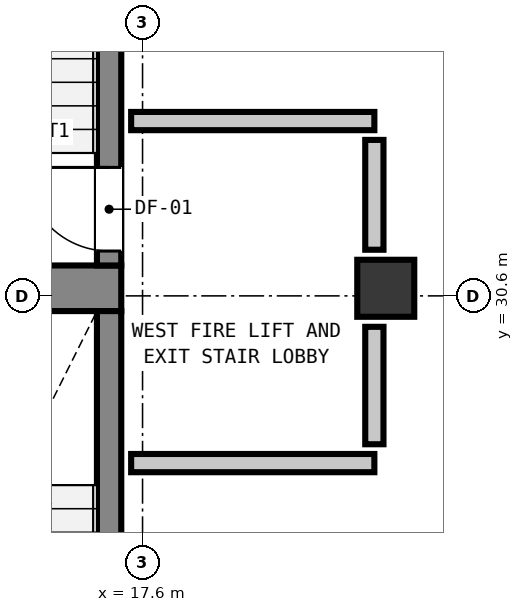
"""IFC4 building model, lengths in metres.
Left out: names, types, materials, properties, quantities, classifications, styles, units other than length and angle.
Written with IfcOpenShell. Run it as: python <this file> out.ifc"""

import sys

from ifc_helpers import new_model, si_unit, direction, frame, frame_2d, origin, origin_2d, place, context, subcontext, project, spatial, rectangle, extrude, element, fill, save


model = new_model("IFC4")
c1 = context("Model", 3, precision=1e-05, world=origin(), true_north=direction((0.0, 1.0)))
c2 = subcontext(c1, "Body", "Model", "MODEL_VIEW")
j1 = project(units=[si_unit("LENGTHUNIT", "METRE"), si_unit("PLANEANGLEUNIT", "RADIAN")], contexts=[c1])
p1 = place(None, origin())
s1 = spatial("IfcSite", under=j1, at=p1, CompositionType="ELEMENT")
p2 = place(p1, origin())
s2 = spatial("IfcBuilding", under=s1, at=p2, CompositionType="ELEMENT")
p3 = place(p2, frame((0.0, 0.0, 287.88)))
s3 = spatial("IfcBuildingStorey", under=s2, at=p3, CompositionType="ELEMENT", Elevation=287.88)
p4 = place(p3, frame((13.24, 30.7, 0.0), z_axis=(0.0, 0.0, 1.0), x_axis=(1.0, 0.0, 0.0)))
e1 = element("IfcWall", 1, at=p4, inside=s3, PredefinedType="SHEAR", context=c2, shape_type="SweptSolid", body=[
    extrude(rectangle(XDim=4.08, YDim=0.6, at=frame_2d((2.04, 0.0))), origin(), (0.0, 0.0, 1.0), 4.9),
])
p5 = place(p3, frame((17.16, 31.0, 0.0), z_axis=(0.0, 0.0, 1.0), x_axis=(0.0, 1.0, 0.0)))
e2 = element("IfcWall", 2, at=p5, inside=s3, PredefinedType="SHEAR", context=c2, shape_type="SweptSolid", body=[
    extrude(rectangle(XDim=7.8, YDim=0.32, at=frame_2d((3.9, 0.0))), origin(), (0.0, 0.0, 1.0), 4.9),
])
p6 = place(p5, frame((0.19, 0.0, 0.0)))
e3 = element("IfcOpeningElement", 3, at=p6, cuts=e2, PredefinedType="OPENING", context=c2, shape_type="SweptSolid", body=[
    extrude(rectangle(XDim=1.1, YDim=2.15, at=frame_2d((0.55, 1.075))), frame((0.0, 0.17, 0.0), z_axis=(0.0, -1.0, 0.0), x_axis=(1.0, 0.0, 0.0)), (0.0, 0.0, 1.0), 0.34),
])
p7 = place(p3, frame((17.16, 22.3, 0.0), z_axis=(0.0, 0.0, 1.0), x_axis=(0.0, 1.0, 0.0)))
e4 = element("IfcWall", 4, at=p7, inside=s3, PredefinedType="SHEAR", context=c2, shape_type="SweptSolid", body=[
    extrude(rectangle(XDim=8.1, YDim=0.32, at=frame_2d((4.05, 0.0))), origin(), (0.0, 0.0, 1.0), 4.9),
])
p8 = place(p7, frame((0.49, 0.0, 0.0)))
e5 = element("IfcOpeningElement", 5, at=p8, cuts=e4, PredefinedType="OPENING", context=c2, shape_type="SweptSolid", body=[
    extrude(rectangle(XDim=1.1, YDim=2.15, at=frame_2d((0.55, 1.075))), frame((0.0, 0.17, 0.0), z_axis=(0.0, -1.0, 0.0), x_axis=(1.0, 0.0, 0.0)), (0.0, 0.0, 1.0), 0.34),
])
p9 = place(p3, frame((20.8, 30.7, 0.0), z_axis=(0.0, 0.0, 1.0), x_axis=(1.0, 0.0, 0.0)))
e6 = element("IfcColumn", 6, at=p9, inside=s3, PredefinedType="COLUMN", context=c2, shape_type="SweptSolid", body=[
    extrude(rectangle(XDim=0.75, YDim=0.75, at=origin_2d()), origin(), (0.0, 0.0, 1.0), 4.9),
])
for number, where, z_axis, x_axis in (
    (7, (17.45, 28.4, 0.0), (0.0, 0.0, 1.0), (1.0, 0.0, 0.0)),
    (8, (17.45, 32.9, 0.0), (0.0, 0.0, 1.0), (1.0, 0.0, 0.0)),
):
    element("IfcWall", number, at=place(p3, frame(where, z_axis=z_axis, x_axis=x_axis)), inside=s3, PredefinedType="PARTITIONING", context=c2, shape_type="SweptSolid", body=[
        extrude(rectangle(XDim=3.2, YDim=0.24, at=frame_2d((1.6, 0.0))), origin(), (0.0, 0.0, 1.0), 4.62),
    ])
p10 = place(p3, frame((20.65, 28.648, 0.0), z_axis=(0.0, 0.0, 1.0), x_axis=(0.0, 1.0, 0.0)))
e9 = element("IfcWall", 9, at=p10, inside=s3, PredefinedType="PARTITIONING", context=c2, shape_type="SweptSolid", body=[
    extrude(rectangle(XDim=1.545, YDim=0.24, at=frame_2d((0.772, 0.0))), origin(), (0.0, 0.0, 1.0), 3.912),
])
p11 = place(p3, frame((20.65, 31.207, 0.0), z_axis=(0.0, 0.0, 1.0), x_axis=(0.0, 1.0, 0.0)))
e10 = element("IfcWall", 10, at=p11, inside=s3, PredefinedType="PARTITIONING", context=c2, shape_type="SweptSolid", body=[
    extrude(rectangle(XDim=1.445, YDim=0.24, at=frame_2d((0.723, 0.0))), origin(), (0.0, 0.0, 1.0), 3.912),
])
p12 = place(p6, origin())
e11 = element("IfcDoor", 11, at=p12, inside=s3, OperationType="SINGLE_SWING_RIGHT", PredefinedType="DOOR", context=c2, shape_type="SweptSolid", body=[
    extrude(rectangle(XDim=1.1, YDim=2.15, at=frame_2d((0.55, 1.075))), frame((0.0, 0.025, 0.0), z_axis=(0.0, -1.0, 0.0), x_axis=(1.0, 0.0, 0.0)), (0.0, 0.0, 1.0), 0.05),
])
fill(e3, e11)
save(model, sys.argv[1])
